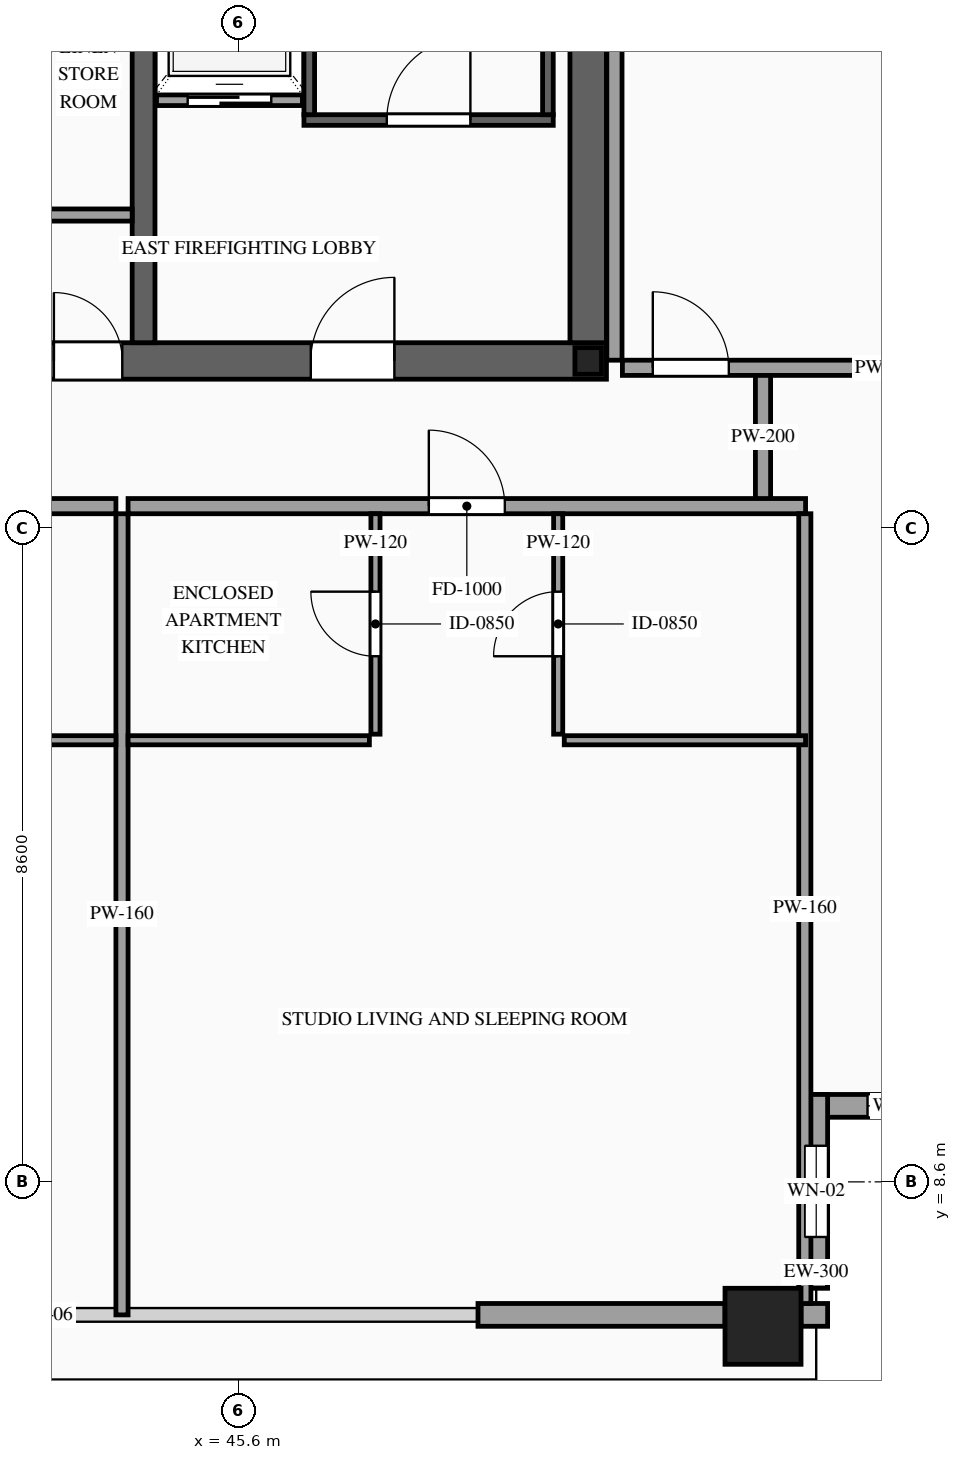
"""IFC4 building model, lengths in metres.
Left out: names, types, materials, properties, quantities, classifications, styles, units other than length and angle.
Written with IfcOpenShell. Run it as: python <this file> out.ifc"""

import sys

from ifc_helpers import new_model, si_unit, direction, frame, frame_2d, origin, origin_2d, place, context, subcontext, project, spatial, rectangle, hollow_rectangle, i_section, extrude, source, transform, mapped, element, fill, save


model = new_model("IFC4")
c1 = context("Model", 3, precision=1e-05, world=origin(), true_north=direction((0.0, 1.0)))
c2 = subcontext(c1, "Body", "Model", "MODEL_VIEW")
j1 = project(units=[si_unit("LENGTHUNIT", "METRE"), si_unit("PLANEANGLEUNIT", "RADIAN")], contexts=[c1])
p1 = place(None, origin())
s1 = spatial("IfcSite", under=j1, at=p1, CompositionType="ELEMENT")
p2 = place(p1, origin())
s2 = spatial("IfcBuilding", under=s1, at=p2, CompositionType="ELEMENT")
p3 = place(p2, frame((0.0, 0.0, 335.7)))
s3 = spatial("IfcBuildingStorey", under=s2, at=p3, CompositionType="ELEMENT", Elevation=335.7)
p4 = place(p3, frame((23.56, 19.4, 0.0), z_axis=(0.0, 0.0, 1.0), x_axis=(1.0, 0.0, 0.0)))
e1 = element("IfcWall", 1, at=p4, inside=s3, PredefinedType="SHEAR", context=c2, shape_type="SweptSolid", body=[
    extrude(rectangle(XDim=26.88, YDim=0.48, at=frame_2d((13.44, 0.0))), origin(), (0.0, 0.0, 1.0), 3.5),
])
p5 = place(p4, frame((1.89, 0.0, 0.0)))
e2 = element("IfcOpeningElement", 2, at=p5, cuts=e1, PredefinedType="OPENING", context=c2, shape_type="SweptSolid", body=[
    extrude(rectangle(XDim=1.1, YDim=2.2, at=frame_2d((0.55, 1.1))), frame((0.0, 0.255, 0.0), z_axis=(0.0, -1.0, 0.0), x_axis=(1.0, 0.0, 0.0)), (0.0, 0.0, 1.0), 0.51),
])
p6 = place(p4, frame((9.79, 0.0, 0.0)))
e3 = element("IfcOpeningElement", 3, at=p6, cuts=e1, PredefinedType="OPENING", context=c2, shape_type="SweptSolid", body=[
    extrude(rectangle(XDim=1.1, YDim=2.2, at=frame_2d((0.55, 1.1))), frame((0.0, 0.255, 0.0), z_axis=(0.0, -1.0, 0.0), x_axis=(1.0, 0.0, 0.0)), (0.0, 0.0, 1.0), 0.51),
])
p7 = place(p4, frame((22.99, 0.0, 0.0)))
e4 = element("IfcOpeningElement", 4, at=p7, cuts=e1, PredefinedType="OPENING", context=c2, shape_type="SweptSolid", body=[
    extrude(rectangle(XDim=1.1, YDim=2.2, at=frame_2d((0.55, 1.1))), frame((0.0, 0.255, 0.0), z_axis=(0.0, -1.0, 0.0), x_axis=(1.0, 0.0, 0.0)), (0.0, 0.0, 1.0), 0.51),
])
p8 = place(p4, frame((19.61, 0.0, 0.0)))
e5 = element("IfcOpeningElement", 5, at=p8, cuts=e1, PredefinedType="OPENING", context=c2, shape_type="SweptSolid", body=[
    extrude(rectangle(XDim=0.9, YDim=2.15, at=frame_2d((0.45, 1.075))), frame((0.0, 0.255, 0.0), z_axis=(0.0, -1.0, 0.0), x_axis=(1.0, 0.0, 0.0)), (0.0, 0.0, 1.0), 0.51),
])
p9 = place(p4, frame((18.17, 0.0, 0.0)))
e6 = element("IfcOpeningElement", 6, at=p9, cuts=e1, PredefinedType="OPENING", context=c2, shape_type="SweptSolid", body=[
    extrude(rectangle(XDim=0.9, YDim=2.15, at=frame_2d((0.45, 1.075))), frame((0.0, 0.255, 0.0), z_axis=(0.0, -1.0, 0.0), x_axis=(1.0, 0.0, 0.0)), (0.0, 0.0, 1.0), 0.51),
])
m1 = source(origin(), c2, "Body", "SweptSolid", [
    extrude(rectangle(XDim=12.32, YDim=0.48, at=frame_2d((6.16, 0.0))), origin(), (0.0, 0.0, 1.0), 3.5),
])
p10 = place(p3, frame((50.2, 19.64, 0.0), z_axis=(0.0, 0.0, 1.0), x_axis=(0.0, 1.0, 0.0)))
e7 = element("IfcWall", 7, at=p10, inside=s3, PredefinedType="SHEAR", context=c2, shape_type="MappedRepresentation", body=[
    mapped(m1, transform((0.0, 0.0, 0.0), scale=1.0)),
])
p11 = place(p3, frame((44.35, 19.64, 0.0), z_axis=(0.0, 0.0, 1.0), x_axis=(0.0, 1.0, 0.0)))
e8 = element("IfcWall", 8, at=p11, inside=s3, PredefinedType="SOLIDWALL", context=c2, shape_type="SweptSolid", body=[
    extrude(rectangle(XDim=12.32, YDim=0.3, at=frame_2d((6.16, 0.0))), origin(), (0.0, 0.0, 1.0), 3.5),
])
p12 = place(p11, frame((6.56, 0.0, 0.0)))
e9 = element("IfcOpeningElement", 9, at=p12, cuts=e8, PredefinedType="OPENING", context=c2, shape_type="SweptSolid", body=[
    extrude(rectangle(XDim=1.1, YDim=2.2, at=frame_2d((0.55, 1.1))), frame((0.0, 0.165, 0.0), z_axis=(0.0, -1.0, 0.0), x_axis=(1.0, 0.0, 0.0)), (0.0, 0.0, 1.0), 0.33),
])
p13 = place(p11, frame((8.66, 0.0, 0.0)))
e10 = element("IfcOpeningElement", 10, at=p13, cuts=e8, PredefinedType="OPENING", context=c2, shape_type="SweptSolid", body=[
    extrude(rectangle(XDim=1.1, YDim=2.2, at=frame_2d((0.55, 1.1))), frame((0.0, 0.165, 0.0), z_axis=(0.0, -1.0, 0.0), x_axis=(1.0, 0.0, 0.0)), (0.0, 0.0, 1.0), 0.33),
])
p14 = place(p11, frame((10.76, 0.0, 0.0)))
e11 = element("IfcOpeningElement", 11, at=p14, cuts=e8, PredefinedType="OPENING", context=c2, shape_type="SweptSolid", body=[
    extrude(rectangle(XDim=1.1, YDim=2.2, at=frame_2d((0.55, 1.1))), frame((0.0, 0.165, 0.0), z_axis=(0.0, -1.0, 0.0), x_axis=(1.0, 0.0, 0.0)), (0.0, 0.0, 1.0), 0.33),
])
m2 = source(origin(), c2, "Body", "SweptSolid", [
    extrude(i_section(OverallWidth=0.35, OverallDepth=0.35, WebThickness=0.012, FlangeThickness=0.019, at=origin_2d()), origin(), (0.0, 0.0, 1.0), 3.5),
])
p15 = place(p3, frame((50.2, 19.4, 0.0), z_axis=(0.0, 0.0, 1.0), x_axis=(1.0, 0.0, 0.0)))
e12 = element("IfcColumn", 12, at=p15, inside=s3, PredefinedType="COLUMN", context=c2, shape_type="MappedRepresentation", body=[
    mapped(m2, transform((0.0, 0.0, 0.0), scale=1.0)),
])
m3 = source(origin(), c2, "Body", "SweptSolid", [
    extrude(hollow_rectangle(XDim=1.0, YDim=1.0, WallThickness=0.048, at=origin_2d()), origin(), (0.0, 0.0, 1.0), 3.5),
])
p16 = place(p3, frame((52.5, 6.7, 0.0), z_axis=(0.0, 0.0, 1.0), x_axis=(1.0, 0.0, 0.0)))
e13 = element("IfcColumn", 13, at=p16, inside=s3, PredefinedType="COLUMN", context=c2, shape_type="MappedRepresentation", body=[
    mapped(m3, transform((0.0, 0.0, 0.0), scale=1.0)),
])
p17 = place(p3, frame((53.05, 9.6, 0.0), z_axis=(0.0, 0.0, 1.0), x_axis=(1.0, 0.0, 0.0)))
e14 = element("IfcWall", 14, at=p17, inside=s3, PredefinedType="SOLIDWALL", context=c2, shape_type="SweptSolid", body=[
    extrude(rectangle(XDim=2.55, YDim=0.3, at=frame_2d((1.275, 0.0))), origin(), (0.0, 0.0, 1.0), 3.26),
])
p18 = place(p17, frame((0.825, 0.0, 0.85)))
e15 = element("IfcOpeningElement", 15, at=p18, cuts=e14, PredefinedType="OPENING", context=c2, shape_type="SweptSolid", body=[
    extrude(rectangle(XDim=0.9, YDim=1.5, at=frame_2d((0.45, 0.75))), frame((0.0, 0.165, 0.0), z_axis=(0.0, -1.0, 0.0), x_axis=(1.0, 0.0, 0.0)), (0.0, 0.0, 1.0), 0.33),
])
p19 = place(p3, frame((53.2, 7.2, 0.0), z_axis=(0.0, 0.0, 1.0), x_axis=(0.0, 1.0, 0.0)))
e16 = element("IfcWall", 16, at=p19, inside=s3, PredefinedType="SOLIDWALL", context=c2, shape_type="SweptSolid", body=[
    extrude(rectangle(XDim=2.55, YDim=0.3, at=frame_2d((1.275, 0.0))), origin(), (0.0, 0.0, 1.0), 3.26),
])
p20 = place(p19, frame((0.675, 0.0, 0.85)))
e17 = element("IfcOpeningElement", 17, at=p20, cuts=e16, PredefinedType="OPENING", context=c2, shape_type="SweptSolid", body=[
    extrude(rectangle(XDim=1.2, YDim=2.1, at=frame_2d((0.6, 1.05))), frame((0.0, 0.165, 0.0), z_axis=(0.0, -1.0, 0.0), x_axis=(1.0, 0.0, 0.0)), (0.0, 0.0, 1.0), 0.33),
])
m4 = source(origin(), c2, "Body", "SweptSolid", [
    extrude(rectangle(XDim=0.35, YDim=0.3, at=frame_2d((0.175, 0.0))), origin(), (0.0, 0.0, 1.0), 3.26),
])
p21 = place(p3, frame((53.0, 6.85, 0.0), z_axis=(0.0, 0.0, 1.0), x_axis=(1.0, 0.0, 0.0)))
e18 = element("IfcWall", 18, at=p21, inside=s3, PredefinedType="SOLIDWALL", context=c2, shape_type="MappedRepresentation", body=[
    mapped(m4, transform((0.0, 0.0, 0.0), scale=1.0)),
])
m5 = source(origin(), c2, "Body", "SweptSolid", [
    extrude(rectangle(XDim=3.25, YDim=0.3, at=frame_2d((1.625, 0.0))), origin(), (0.0, 0.0, 1.0), 2.865),
])
p22 = place(p3, frame((48.75, 6.85, 0.0), z_axis=(0.0, 0.0, 1.0), x_axis=(1.0, 0.0, 0.0)))
e19 = element("IfcWall", 19, at=p22, inside=s3, PredefinedType="SOLIDWALL", context=c2, shape_type="MappedRepresentation", body=[
    mapped(m5, transform((0.0, 0.0, 0.0), scale=1.0)),
])
p23 = place(p3, frame((44.52, 22.83, 0.0), z_axis=(0.0, 0.0, 1.0), x_axis=(1.0, 0.0, 0.0)))
e20 = element("IfcWall", 20, at=p23, inside=s3, PredefinedType="SOLIDWALL", context=c2, shape_type="SweptSolid", body=[
    extrude(rectangle(XDim=1.92, YDim=0.14, at=frame_2d((0.96, 0.0))), origin(), (0.0, 0.0, 1.0), 3.26),
])
p24 = place(p23, frame((0.41, 0.0, 0.0)))
e21 = element("IfcOpeningElement", 21, at=p24, cuts=e20, PredefinedType="OPENING", context=c2, shape_type="SweptSolid", body=[
    extrude(rectangle(XDim=1.1, YDim=2.2, at=frame_2d((0.55, 1.1))), frame((0.0, 0.085, 0.0), z_axis=(0.0, -1.0, 0.0), x_axis=(1.0, 0.0, 0.0)), (0.0, 0.0, 1.0), 0.17),
])
p25 = place(p3, frame((46.46, 22.57, 0.0), z_axis=(0.0, 0.0, 1.0), x_axis=(1.0, 0.0, 0.0)))
e22 = element("IfcWall", 22, at=p25, inside=s3, PredefinedType="SOLIDWALL", context=c2, shape_type="SweptSolid", body=[
    extrude(rectangle(XDim=3.28, YDim=0.14, at=frame_2d((1.64, 0.0))), origin(), (0.0, 0.0, 1.0), 3.26),
])
p26 = place(p25, frame((1.09, 0.0, 0.0)))
e23 = element("IfcOpeningElement", 23, at=p26, cuts=e22, PredefinedType="OPENING", context=c2, shape_type="SweptSolid", body=[
    extrude(rectangle(XDim=1.1, YDim=2.2, at=frame_2d((0.55, 1.1))), frame((0.0, 0.085, 0.0), z_axis=(0.0, -1.0, 0.0), x_axis=(1.0, 0.0, 0.0)), (0.0, 0.0, 1.0), 0.17),
])
m6 = source(origin(), c2, "Body", "SweptSolid", [
    extrude(rectangle(XDim=8.94, YDim=0.14, at=frame_2d((4.47, 0.0))), origin(), (0.0, 0.0, 1.0), 3.26),
])
for number, where, z_axis, x_axis in (
    (24, (46.53, 22.64, 0.0), (0.0, 0.0, 1.0), (0.0, 1.0, 0.0)),
    (25, (49.67, 22.64, 0.0), (0.0, 0.0, 1.0), (0.0, 1.0, 0.0)),
):
    element("IfcWall", number, at=place(p3, frame(where, z_axis=z_axis, x_axis=x_axis)), inside=s3, PredefinedType="SOLIDWALL", context=c2, shape_type="MappedRepresentation", body=[
        mapped(m6, transform((0.0, 0.0, 0.0), scale=1.0)),
    ])
m7 = source(origin(), c2, "Body", "SweptSolid", [
    extrude(rectangle(XDim=1.17, YDim=0.16, at=frame_2d((0.585, 0.0))), origin(), (0.0, 0.0, 1.0), 3.26),
])
p27 = place(p3, frame((43.03, 21.32, 0.0), z_axis=(0.0, 0.0, 1.0), x_axis=(1.0, 0.0, 0.0)))
e26 = element("IfcWall", 26, at=p27, inside=s3, PredefinedType="PARTITIONING", context=c2, shape_type="MappedRepresentation", body=[
    mapped(m7, transform((0.0, 0.0, 0.0), scale=1.0)),
])
m8 = source(origin(), c2, "Body", "SweptSolid", [
    extrude(rectangle(XDim=1.7, YDim=0.2, at=frame_2d((0.85, 0.0))), origin(), (0.0, 0.0, 1.0), 3.26),
])
p28 = place(p3, frame((52.5, 17.55, 0.0), z_axis=(0.0, 0.0, 1.0), x_axis=(0.0, 1.0, 0.0)))
e27 = element("IfcWall", 27, at=p28, inside=s3, PredefinedType="PARTITIONING", context=c2, shape_type="MappedRepresentation", body=[
    mapped(m8, transform((0.0, 0.0, 0.0), scale=1.0)),
])
p29 = place(p3, frame((32.583, 17.49, 0.0), z_axis=(0.0, 0.0, 1.0), x_axis=(1.0, 0.0, 0.0)))
e28 = element("IfcWall", 28, at=p29, inside=s3, PredefinedType="PARTITIONING", context=c2, shape_type="SweptSolid", body=[
    extrude(rectangle(XDim=11.403, YDim=0.2, at=frame_2d((5.702, 0.0))), origin(), (0.0, 0.0, 1.0), 3.26),
])
p30 = place(p29, frame((4.517, 0.0, 0.0)))
e29 = element("IfcOpeningElement", 29, at=p30, cuts=e28, PredefinedType="OPENING", context=c2, shape_type="SweptSolid", body=[
    extrude(rectangle(XDim=1.0, YDim=2.2, at=frame_2d((0.5, 1.1))), frame((0.0, 0.115, 0.0), z_axis=(0.0, -1.0, 0.0), x_axis=(1.0, 0.0, 0.0)), (0.0, 0.0, 1.0), 0.23),
])
m9 = source(origin(), c2, "Body", "SweptSolid", [
    extrude(rectangle(XDim=10.54, YDim=0.16, at=frame_2d((5.27, 0.0))), origin(), (0.0, 0.0, 1.0), 3.26),
])
p31 = place(p3, frame((44.066, 6.85, 0.0), z_axis=(0.0, 0.0, 1.0), x_axis=(0.0, 1.0, 0.0)))
e30 = element("IfcWall", 30, at=p31, inside=s3, PredefinedType="PARTITIONING", context=c2, shape_type="MappedRepresentation", body=[
    mapped(m9, transform((0.0, 0.0, 0.0), scale=1.0)),
])
m10 = source(origin(), c2, "Body", "SweptSolid", [
    extrude(rectangle(XDim=4.789, YDim=0.12, at=frame_2d((2.395, 0.0))), origin(), (0.0, 0.0, 1.0), 3.26),
])
p32 = place(p3, frame((39.197, 14.41, 0.0), z_axis=(0.0, 0.0, 1.0), x_axis=(1.0, 0.0, 0.0)))
e31 = element("IfcWall", 31, at=p32, inside=s3, PredefinedType="PARTITIONING", context=c2, shape_type="MappedRepresentation", body=[
    mapped(m10, transform((0.0, 0.0, 0.0), scale=1.0)),
])
p33 = place(p3, frame((44.146, 17.49, 0.0), z_axis=(0.0, 0.0, 1.0), x_axis=(1.0, 0.0, 0.0)))
e32 = element("IfcWall", 32, at=p33, inside=s3, PredefinedType="PARTITIONING", context=c2, shape_type="SweptSolid", body=[
    extrude(rectangle(XDim=8.914, YDim=0.2, at=frame_2d((4.457, 0.0))), origin(), (0.0, 0.0, 1.0), 3.26),
])
p34 = place(p33, frame((3.957, 0.0, 0.0)))
e33 = element("IfcOpeningElement", 33, at=p34, cuts=e32, PredefinedType="OPENING", context=c2, shape_type="SweptSolid", body=[
    extrude(rectangle(XDim=1.0, YDim=2.2, at=frame_2d((0.5, 1.1))), frame((0.0, 0.115, 0.0), z_axis=(0.0, -1.0, 0.0), x_axis=(1.0, 0.0, 0.0)), (0.0, 0.0, 1.0), 0.23),
])
m11 = source(origin(), c2, "Body", "SweptSolid", [
    extrude(rectangle(XDim=10.39, YDim=0.16, at=frame_2d((5.195, 0.0))), origin(), (0.0, 0.0, 1.0), 3.26),
])
p35 = place(p3, frame((53.05, 7.0, 0.0), z_axis=(0.0, 0.0, 1.0), x_axis=(0.0, 1.0, 0.0)))
e34 = element("IfcWall", 34, at=p35, inside=s3, PredefinedType="PARTITIONING", context=c2, shape_type="MappedRepresentation", body=[
    mapped(m11, transform((0.0, 0.0, 0.0), scale=1.0)),
])
m12 = source(origin(), c2, "Body", "SweptSolid", [
    extrude(rectangle(XDim=3.175, YDim=0.12, at=frame_2d((1.587, 0.0))), origin(), (0.0, 0.0, 1.0), 3.26),
])
p36 = place(p3, frame((44.146, 14.41, 0.0), z_axis=(0.0, 0.0, 1.0), x_axis=(1.0, 0.0, 0.0)))
e35 = element("IfcWall", 35, at=p36, inside=s3, PredefinedType="PARTITIONING", context=c2, shape_type="MappedRepresentation", body=[
    mapped(m12, transform((0.0, 0.0, 0.0), scale=1.0)),
])
p37 = place(p3, frame((47.401, 14.49, 0.0), z_axis=(0.0, 0.0, 1.0), x_axis=(0.0, 1.0, 0.0)))
e36 = element("IfcWall", 36, at=p37, inside=s3, PredefinedType="PARTITIONING", context=c2, shape_type="SweptSolid", body=[
    extrude(rectangle(XDim=2.9, YDim=0.12, at=frame_2d((1.45, 0.0))), origin(), (0.0, 0.0, 1.0), 3.26),
])
p38 = place(p37, frame((1.025, 0.0, 0.0)))
e37 = element("IfcOpeningElement", 37, at=p38, cuts=e36, PredefinedType="OPENING", context=c2, shape_type="SweptSolid", body=[
    extrude(rectangle(XDim=0.85, YDim=2.1, at=frame_2d((0.425, 1.05))), frame((0.0, 0.075, 0.0), z_axis=(0.0, -1.0, 0.0), x_axis=(1.0, 0.0, 0.0)), (0.0, 0.0, 1.0), 0.15),
])
p39 = place(p3, frame((49.885, 14.41, 0.0), z_axis=(0.0, 0.0, 1.0), x_axis=(1.0, 0.0, 0.0)))
e38 = element("IfcWall", 38, at=p39, inside=s3, PredefinedType="PARTITIONING", context=c2, shape_type="MappedRepresentation", body=[
    mapped(m12, transform((0.0, 0.0, 0.0), scale=1.0)),
])
p40 = place(p3, frame((49.805, 14.49, 0.0), z_axis=(0.0, 0.0, 1.0), x_axis=(0.0, 1.0, 0.0)))
e39 = element("IfcWall", 39, at=p40, inside=s3, PredefinedType="PARTITIONING", context=c2, shape_type="SweptSolid", body=[
    extrude(rectangle(XDim=2.9, YDim=0.12, at=frame_2d((1.45, 0.0))), origin(), (0.0, 0.0, 1.0), 3.26),
])
p41 = place(p40, frame((1.025, 0.0, 0.0)))
e40 = element("IfcOpeningElement", 40, at=p41, cuts=e39, PredefinedType="OPENING", context=c2, shape_type="SweptSolid", body=[
    extrude(rectangle(XDim=0.85, YDim=2.1, at=frame_2d((0.425, 1.05))), frame((0.0, 0.075, 0.0), z_axis=(0.0, -1.0, 0.0), x_axis=(1.0, 0.0, 0.0)), (0.0, 0.0, 1.0), 0.15),
])
p42 = place(p3, frame((50.65, 19.31, 0.0), z_axis=(0.0, 0.0, 1.0), x_axis=(1.0, 0.0, 0.0)))
e41 = element("IfcWall", 41, at=p42, inside=s3, PredefinedType="PARTITIONING", context=c2, shape_type="SweptSolid", body=[
    extrude(rectangle(XDim=5.3, YDim=0.2, at=frame_2d((2.65, 0.0))), origin(), (0.0, 0.0, 1.0), 2.805),
])
p43 = place(p42, frame((0.4, 0.0, 0.0)))
e42 = element("IfcOpeningElement", 42, at=p43, cuts=e41, PredefinedType="OPENING", context=c2, shape_type="SweptSolid", body=[
    extrude(rectangle(XDim=1.0, YDim=2.2, at=frame_2d((0.5, 1.1))), frame((0.0, 0.115, 0.0), z_axis=(0.0, -1.0, 0.0), x_axis=(1.0, 0.0, 0.0)), (0.0, 0.0, 1.0), 0.23),
])
m13 = source(origin(), c2, "Body", "SweptSolid", [
    extrude(rectangle(XDim=12.78, YDim=0.2, at=frame_2d((6.39, 0.0))), origin(), (0.0, 0.0, 1.0), 3.26),
])
p44 = place(p3, frame((50.545, 19.41, 0.0), z_axis=(0.0, 0.0, 1.0), x_axis=(0.0, 1.0, 0.0)))
e43 = element("IfcWall", 43, at=p44, inside=s3, PredefinedType="PARTITIONING", context=c2, shape_type="MappedRepresentation", body=[
    mapped(m13, transform((0.0, 0.0, 0.0), scale=1.0)),
])
m14 = source(origin(), c2, "Body", "SweptSolid", [
    extrude(rectangle(XDim=0.9, YDim=1.5, at=frame_2d((0.45, 0.75))), frame((0.0, 0.03, 0.0), z_axis=(0.0, -1.0, 0.0), x_axis=(1.0, 0.0, 0.0)), (0.0, 0.0, 1.0), 0.06),
])
p45 = place(p18, origin())
e44 = element("IfcWindow", 44, at=p45, inside=s3, PartitioningType="SINGLE_PANEL", PredefinedType="WINDOW", context=c2, shape_type="MappedRepresentation", body=[
    mapped(m14, transform((0.0, 0.0, 0.0), scale=1.0)),
])
fill(e15, e44)
m15 = source(origin(), c2, "Body", "SweptSolid", [
    extrude(rectangle(XDim=1.2, YDim=2.1, at=frame_2d((0.6, 1.05))), frame((0.0, 0.03, 0.0), z_axis=(0.0, -1.0, 0.0), x_axis=(1.0, 0.0, 0.0)), (0.0, 0.0, 1.0), 0.06),
])
p46 = place(p20, origin())
e45 = element("IfcWindow", 45, at=p46, inside=s3, PartitioningType="SINGLE_PANEL", PredefinedType="WINDOW", context=c2, shape_type="MappedRepresentation", body=[
    mapped(m15, transform((0.0, 0.0, 0.0), scale=1.0)),
])
fill(e17, e45)
m16 = source(origin(), c2, "Body", "SweptSolid", [
    extrude(rectangle(XDim=1.1, YDim=2.2, at=frame_2d((0.55, 1.1))), frame((0.0, 0.025, 0.0), z_axis=(0.0, -1.0, 0.0), x_axis=(1.0, 0.0, 0.0)), (0.0, 0.0, 1.0), 0.05),
])
p47 = place(p24, origin())
e46 = element("IfcDoor", 46, at=p47, inside=s3, OperationType="SLIDING_TO_RIGHT", PredefinedType="DOOR", context=c2, shape_type="MappedRepresentation", body=[
    mapped(m16, transform((0.0, 0.0, 0.0), scale=1.0)),
])
fill(e21, e46)
m17 = source(origin(), c2, "Body", "SweptSolid", [
    extrude(rectangle(XDim=1.1, YDim=2.2, at=frame_2d((0.55, 1.1))), frame((0.0, 0.025, 0.0), z_axis=(0.0, -1.0, 0.0), x_axis=(1.0, 0.0, 0.0)), (0.0, 0.0, 1.0), 0.05),
])
p48 = place(p26, origin())
e47 = element("IfcDoor", 47, at=p48, inside=s3, OperationType="SINGLE_SWING_RIGHT", PredefinedType="DOOR", context=c2, shape_type="MappedRepresentation", body=[
    mapped(m17, transform((0.0, 0.0, 0.0), scale=1.0)),
])
fill(e23, e47)
p49 = place(p7, origin())
e48 = element("IfcDoor", 48, at=p49, inside=s3, OperationType="SINGLE_SWING_RIGHT", PredefinedType="DOOR", context=c2, shape_type="MappedRepresentation", body=[
    mapped(m17, transform((0.0, 0.0, 0.0), scale=1.0)),
])
fill(e4, e48)
m18 = source(origin(), c2, "Body", "SweptSolid", [
    extrude(rectangle(XDim=0.9, YDim=2.15, at=frame_2d((0.45, 1.075))), frame((0.0, 0.025, 0.0), z_axis=(0.0, -1.0, 0.0), x_axis=(1.0, 0.0, 0.0)), (0.0, 0.0, 1.0), 0.05),
])
p50 = place(p8, origin())
e49 = element("IfcDoor", 49, at=p50, inside=s3, OperationType="SINGLE_SWING_LEFT", PredefinedType="DOOR", context=c2, shape_type="MappedRepresentation", body=[
    mapped(m18, transform((0.0, 0.0, 0.0), scale=1.0)),
])
fill(e5, e49)
m19 = source(origin(), c2, "Body", "SweptSolid", [
    extrude(rectangle(XDim=1.0, YDim=2.2, at=frame_2d((0.5, 1.1))), frame((0.0, 0.025, 0.0), z_axis=(0.0, -1.0, 0.0), x_axis=(1.0, 0.0, 0.0)), (0.0, 0.0, 1.0), 0.05),
])
p51 = place(p34, origin())
e50 = element("IfcDoor", 50, at=p51, inside=s3, OperationType="SINGLE_SWING_LEFT", PredefinedType="DOOR", context=c2, shape_type="MappedRepresentation", body=[
    mapped(m19, transform((0.0, 0.0, 0.0), scale=1.0)),
])
fill(e33, e50)
m20 = source(origin(), c2, "Body", "SweptSolid", [
    extrude(rectangle(XDim=0.85, YDim=2.1, at=frame_2d((0.425, 1.05))), frame((0.0, 0.025, 0.0), z_axis=(0.0, -1.0, 0.0), x_axis=(1.0, 0.0, 0.0)), (0.0, 0.0, 1.0), 0.05),
])
p52 = place(p38, origin())
e51 = element("IfcDoor", 51, at=p52, inside=s3, OperationType="SINGLE_SWING_RIGHT", PredefinedType="DOOR", context=c2, shape_type="MappedRepresentation", body=[
    mapped(m20, transform((0.0, 0.0, 0.0), scale=1.0)),
])
fill(e37, e51)
p53 = place(p41, origin())
e52 = element("IfcDoor", 52, at=p53, inside=s3, OperationType="SINGLE_SWING_LEFT", PredefinedType="DOOR", context=c2, shape_type="MappedRepresentation", body=[
    mapped(m20, transform((0.0, 0.0, 0.0), scale=1.0)),
])
fill(e40, e52)
p54 = place(p43, origin())
e53 = element("IfcDoor", 53, at=p54, inside=s3, OperationType="SINGLE_SWING_LEFT", PredefinedType="DOOR", context=c2, shape_type="MappedRepresentation", body=[
    mapped(m19, transform((0.0, 0.0, 0.0), scale=1.0)),
])
fill(e42, e53)
save(model, sys.argv[1])
